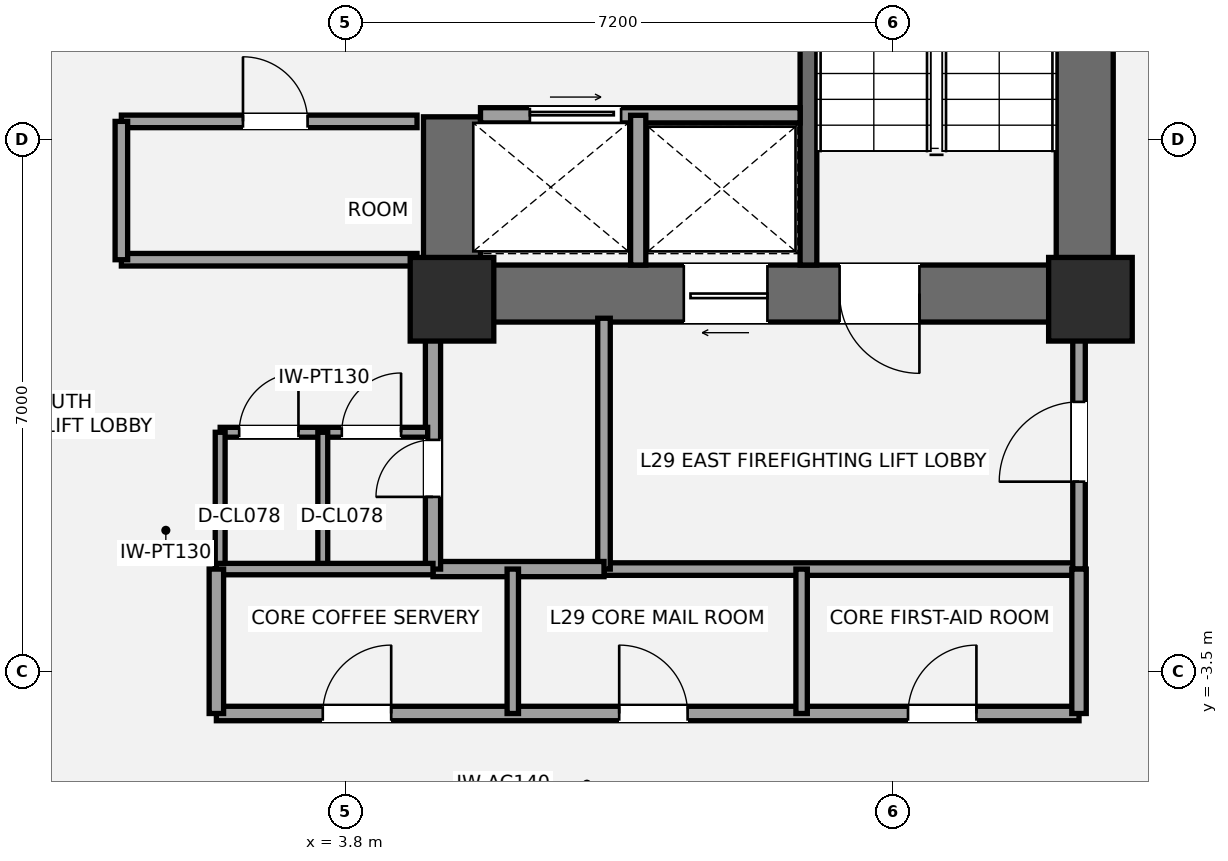
"""IFC4 building model, lengths in metres.
Left out: names, types, materials, properties, quantities, classifications, styles, units other than length and angle.
Written with IfcOpenShell. Run it as: python <this file> out.ifc"""

import sys

from ifc_helpers import new_model, si_unit, direction, frame, frame_2d, origin, origin_2d, place, context, subcontext, project, spatial, rectangle, extrude, element, fill, save


model = new_model("IFC4")
c1 = context("Model", 3, precision=1e-05, world=origin(), true_north=direction((0.0, 1.0)))
c2 = subcontext(c1, "Body", "Model", "MODEL_VIEW")
j1 = project(units=[si_unit("LENGTHUNIT", "METRE"), si_unit("PLANEANGLEUNIT", "RADIAN")], contexts=[c1])
p1 = place(None, origin())
s1 = spatial("IfcSite", under=j1, at=p1, CompositionType="ELEMENT")
p2 = place(p1, origin())
s2 = spatial("IfcBuilding", under=s1, at=p2, CompositionType="ELEMENT")
p3 = place(p2, frame((0.0, 0.0, 110.6)))
s3 = spatial("IfcBuildingStorey", under=s2, at=p3, CompositionType="ELEMENT", Elevation=110.6)
p4 = place(p3, frame((13.525, 1.1, 0.0), z_axis=(0.0, 0.0, 1.0), x_axis=(0.0, 1.0, 0.0)))
e1 = element("IfcWall", 1, at=p4, inside=s3, PredefinedType="SHEAR", context=c2, shape_type="SweptSolid", body=[
    extrude(rectangle(XDim=8.65, YDim=0.75, at=frame_2d((4.325, 0.0))), origin(), (0.0, 0.0, 1.0), 3.5),
])
p5 = place(p3, frame((13.9, 1.475, 0.0), z_axis=(0.0, 0.0, 1.0), x_axis=(-1.0, 0.0, 0.0)))
e2 = element("IfcWall", 2, at=p5, inside=s3, PredefinedType="SHEAR", context=c2, shape_type="SweptSolid", body=[
    extrude(rectangle(XDim=9.075, YDim=0.75, at=frame_2d((4.538, 0.0))), origin(), (0.0, 0.0, 1.0), 3.5),
])
p6 = place(p5, frame((2.55, 0.0, 0.0)))
e3 = element("IfcOpeningElement", 3, at=p6, cuts=e2, PredefinedType="OPENING", context=c2, shape_type="SweptSolid", body=[
    extrude(rectangle(XDim=1.05, YDim=2.15, at=frame_2d((0.525, 1.075))), frame((0.0, 0.385, 0.0), z_axis=(0.0, -1.0, 0.0), x_axis=(1.0, 0.0, 0.0)), (0.0, 0.0, 1.0), 0.77),
])
p7 = place(p5, frame((4.55, 0.0, 0.0)))
e4 = element("IfcOpeningElement", 4, at=p7, cuts=e2, PredefinedType="OPENING", context=c2, shape_type="SweptSolid", body=[
    extrude(rectangle(XDim=1.1, YDim=2.2, at=frame_2d((0.55, 1.1))), frame((0.0, 0.385, 0.0), z_axis=(0.0, -1.0, 0.0), x_axis=(1.0, 0.0, 0.0)), (0.0, 0.0, 1.0), 0.77),
])
p8 = place(p3, frame((5.2, 1.1, 0.0), z_axis=(0.0, 0.0, 1.0), x_axis=(0.0, 1.0, 0.0)))
e5 = element("IfcWall", 5, at=p8, inside=s3, PredefinedType="SHEAR", context=c2, shape_type="SweptSolid", body=[
    extrude(rectangle(XDim=2.7, YDim=0.75, at=frame_2d((1.35, 0.0))), origin(), (0.0, 0.0, 1.0), 3.5),
])
p9 = place(p3, frame((9.89, 1.85, 0.0), z_axis=(0.0, 0.0, 1.0), x_axis=(0.0, 1.0, 0.0)))
e6 = element("IfcWall", 6, at=p9, inside=s3, PredefinedType="SHEAR", context=c2, shape_type="SweptSolid", body=[
    extrude(rectangle(XDim=7.15, YDim=0.22, at=frame_2d((3.575, 0.0))), origin(), (0.0, 0.0, 1.0), 3.5),
])
for number, where, z_axis, x_axis in (
    (7, (5.2, 1.4, 0.0), (0.0, 0.0, 1.0), (1.0, 0.0, 0.0)),
    (8, (13.6, 1.4, 0.0), (0.0, 0.0, 1.0), (1.0, 0.0, 0.0)),
):
    element("IfcColumn", number, at=place(p3, frame(where, z_axis=z_axis, x_axis=x_axis)), inside=s3, PredefinedType="COLUMN", context=c2, shape_type="SweptSolid", body=[
        extrude(rectangle(XDim=1.1, YDim=1.1, at=origin_2d()), origin(), (0.0, 0.0, 1.0), 3.5),
    ])
p10 = place(p3, frame((7.2, -2.15, 0.0), z_axis=(0.0, 0.0, 1.0), x_axis=(1.0, 0.0, 0.0)))
e9 = element("IfcWall", 9, at=p10, inside=s3, PredefinedType="PARTITIONING", context=c2, shape_type="SweptSolid", body=[
    extrude(rectangle(XDim=6.25, YDim=0.165, at=frame_2d((3.125, 0.0))), origin(), (0.0, 0.0, 1.0), 3.31),
])
p11 = place(p3, frame((7.2, -2.15, 0.0), z_axis=(0.0, 0.0, 1.0), x_axis=(0.0, 1.0, 0.0)))
e10 = element("IfcWall", 10, at=p11, inside=s3, PredefinedType="PARTITIONING", context=c2, shape_type="SweptSolid", body=[
    extrude(rectangle(XDim=3.3, YDim=0.165, at=frame_2d((1.65, 0.0))), origin(), (0.0, 0.0, 1.0), 3.31),
])
p12 = place(p3, frame((13.45, -2.15, 0.0), z_axis=(0.0, 0.0, 1.0), x_axis=(0.0, 1.0, 0.0)))
e11 = element("IfcWall", 11, at=p12, inside=s3, PredefinedType="PARTITIONING", context=c2, shape_type="SweptSolid", body=[
    extrude(rectangle(XDim=3.3, YDim=0.165, at=frame_2d((1.65, 0.0))), origin(), (0.0, 0.0, 1.0), 2.763),
])
p13 = place(p12, frame((1.15, 0.0, 0.0)))
e12 = element("IfcOpeningElement", 12, at=p13, cuts=e11, PredefinedType="OPENING", context=c2, shape_type="SweptSolid", body=[
    extrude(rectangle(XDim=1.05, YDim=2.15, at=frame_2d((0.525, 1.075))), frame((0.0, 0.093, 0.0), z_axis=(0.0, -1.0, 0.0), x_axis=(1.0, 0.0, 0.0)), (0.0, 0.0, 1.0), 0.185),
])
p14 = place(p3, frame((4.95, -2.15, 0.0), z_axis=(0.0, 0.0, 1.0), x_axis=(1.0, 0.0, 0.0)))
e13 = element("IfcWall", 13, at=p14, inside=s3, PredefinedType="SOLIDWALL", context=c2, shape_type="SweptSolid", body=[
    extrude(rectangle(XDim=2.25, YDim=0.2, at=frame_2d((1.125, 0.0))), origin(), (0.0, 0.0, 1.0), 3.31),
])
p15 = place(p3, frame((4.95, -2.15, 0.0), z_axis=(0.0, 0.0, 1.0), x_axis=(0.0, 1.0, 0.0)))
e14 = element("IfcWall", 14, at=p15, inside=s3, PredefinedType="SOLIDWALL", context=c2, shape_type="SweptSolid", body=[
    extrude(rectangle(XDim=3.3, YDim=0.2, at=frame_2d((1.65, 0.0))), origin(), (0.0, 0.0, 1.0), 3.31),
])
p16 = place(p15, frame((0.95, 0.0, 0.0)))
e15 = element("IfcOpeningElement", 15, at=p16, cuts=e14, PredefinedType="OPENING", context=c2, shape_type="SweptSolid", body=[
    extrude(rectangle(XDim=0.75, YDim=2.1, at=frame_2d((0.375, 1.05))), frame((0.0, 0.11, 0.0), z_axis=(0.0, -1.0, 0.0), x_axis=(1.0, 0.0, 0.0)), (0.0, 0.0, 1.0), 0.22),
])
p17 = place(p3, frame((2.15, -0.35, 0.0), z_axis=(0.0, 0.0, 1.0), x_axis=(1.0, 0.0, 0.0)))
e16 = element("IfcWall", 16, at=p17, inside=s3, PredefinedType="PARTITIONING", context=c2, shape_type="SweptSolid", body=[
    extrude(rectangle(XDim=2.73, YDim=0.13, at=frame_2d((1.365, 0.0))), origin(), (0.0, 0.0, 1.0), 3.31),
])
p18 = place(p17, frame((0.25, 0.0, 0.0)))
e17 = element("IfcOpeningElement", 17, at=p18, cuts=e16, PredefinedType="OPENING", context=c2, shape_type="SweptSolid", body=[
    extrude(rectangle(XDim=0.78, YDim=2.1, at=frame_2d((0.39, 1.05))), frame((0.0, 0.075, 0.0), z_axis=(0.0, -1.0, 0.0), x_axis=(1.0, 0.0, 0.0)), (0.0, 0.0, 1.0), 0.15),
])
p19 = place(p17, frame((1.6, 0.0, 0.0)))
e18 = element("IfcOpeningElement", 18, at=p19, cuts=e16, PredefinedType="OPENING", context=c2, shape_type="SweptSolid", body=[
    extrude(rectangle(XDim=0.78, YDim=2.1, at=frame_2d((0.39, 1.05))), frame((0.0, 0.075, 0.0), z_axis=(0.0, -1.0, 0.0), x_axis=(1.0, 0.0, 0.0)), (0.0, 0.0, 1.0), 0.15),
])
for number, where, z_axis, x_axis in (
    (19, (2.15, -2.15, 0.0), (0.0, 0.0, 1.0), (0.0, 1.0, 0.0)),
    (20, (3.5, -2.15, 0.0), (0.0, 0.0, 1.0), (0.0, 1.0, 0.0)),
):
    element("IfcWall", number, at=place(p3, frame(where, z_axis=z_axis, x_axis=x_axis)), inside=s3, PredefinedType="PARTITIONING", context=c2, shape_type="SweptSolid", body=[
        extrude(rectangle(XDim=1.8, YDim=0.13, at=frame_2d((0.9, 0.0))), origin(), (0.0, 0.0, 1.0), 3.31),
    ])
p20 = place(p3, frame((5.575, 3.82, 0.0), z_axis=(0.0, 0.0, 1.0), x_axis=(1.0, 0.0, 0.0)))
e21 = element("IfcWall", 21, at=p20, inside=s3, PredefinedType="SOLIDWALL", context=c2, shape_type="SweptSolid", body=[
    extrude(rectangle(XDim=4.205, YDim=0.2, at=frame_2d((2.103, 0.0))), origin(), (0.0, 0.0, 1.0), 3.31),
])
p21 = place(p20, frame((0.65, 0.0, 0.0)))
e22 = element("IfcOpeningElement", 22, at=p21, cuts=e21, PredefinedType="OPENING", context=c2, shape_type="SweptSolid", body=[
    extrude(rectangle(XDim=1.2, YDim=2.2, at=frame_2d((0.6, 1.1))), frame((0.0, 0.11, 0.0), z_axis=(0.0, -1.0, 0.0), x_axis=(1.0, 0.0, 0.0)), (0.0, 0.0, 1.0), 0.22),
])
p22 = place(p3, frame((7.65, 1.85, 0.0), z_axis=(0.0, 0.0, 1.0), x_axis=(0.0, 1.0, 0.0)))
e23 = element("IfcWall", 23, at=p22, inside=s3, PredefinedType="SOLIDWALL", context=c2, shape_type="SweptSolid", body=[
    extrude(rectangle(XDim=1.97, YDim=0.2, at=frame_2d((0.985, 0.0))), origin(), (0.0, 0.0, 1.0), 3.31),
])
p23 = place(p3, frame((0.85, 1.92, 0.0), z_axis=(0.0, 0.0, 1.0), x_axis=(1.0, 0.0, 0.0)))
e24 = element("IfcWall", 24, at=p23, inside=s3, PredefinedType="PARTITIONING", context=c2, shape_type="SweptSolid", body=[
    extrude(rectangle(XDim=3.89, YDim=0.165, at=frame_2d((1.945, 0.0))), origin(), (0.0, 0.0, 1.0), 2.3),
])
p24 = place(p3, frame((0.85, 3.74, 0.0), z_axis=(0.0, 0.0, 1.0), x_axis=(1.0, 0.0, 0.0)))
e25 = element("IfcWall", 25, at=p24, inside=s3, PredefinedType="PARTITIONING", context=c2, shape_type="SweptSolid", body=[
    extrude(rectangle(XDim=3.89, YDim=0.165, at=frame_2d((1.945, 0.0))), origin(), (0.0, 0.0, 1.0), 3.31),
])
p25 = place(p24, frame((1.6, 0.0, 0.0)))
e26 = element("IfcOpeningElement", 26, at=p25, cuts=e25, PredefinedType="OPENING", context=c2, shape_type="SweptSolid", body=[
    extrude(rectangle(XDim=0.85, YDim=2.1, at=frame_2d((0.425, 1.05))), frame((0.0, 0.093, 0.0), z_axis=(0.0, -1.0, 0.0), x_axis=(1.0, 0.0, 0.0)), (0.0, 0.0, 1.0), 0.185),
])
p26 = place(p3, frame((0.85, 1.92, 0.0), z_axis=(0.0, 0.0, 1.0), x_axis=(0.0, 1.0, 0.0)))
e27 = element("IfcWall", 27, at=p26, inside=s3, PredefinedType="PARTITIONING", context=c2, shape_type="SweptSolid", body=[
    extrude(rectangle(XDim=1.82, YDim=0.165, at=frame_2d((0.91, 0.0))), origin(), (0.0, 0.0, 1.0), 3.31),
])
p27 = place(p3, frame((2.1, -4.05, 0.0), z_axis=(0.0, 0.0, 1.0), x_axis=(1.0, 0.0, 0.0)))
e28 = element("IfcWall", 28, at=p27, inside=s3, PredefinedType="PLUMBINGWALL", context=c2, shape_type="SweptSolid", body=[
    extrude(rectangle(XDim=11.35, YDim=0.19, at=frame_2d((5.675, 0.0))), origin(), (0.0, 0.0, 1.0), 2.763),
])
p28 = place(p27, frame((1.4, 0.0, 0.0)))
e29 = element("IfcOpeningElement", 29, at=p28, cuts=e28, PredefinedType="OPENING", context=c2, shape_type="SweptSolid", body=[
    extrude(rectangle(XDim=0.9, YDim=2.1, at=frame_2d((0.45, 1.05))), frame((0.0, 0.105, 0.0), z_axis=(0.0, -1.0, 0.0), x_axis=(1.0, 0.0, 0.0)), (0.0, 0.0, 1.0), 0.21),
])
p29 = place(p27, frame((5.3, 0.0, 0.0)))
e30 = element("IfcOpeningElement", 30, at=p29, cuts=e28, PredefinedType="OPENING", context=c2, shape_type="SweptSolid", body=[
    extrude(rectangle(XDim=0.9, YDim=2.1, at=frame_2d((0.45, 1.05))), frame((0.0, 0.105, 0.0), z_axis=(0.0, -1.0, 0.0), x_axis=(1.0, 0.0, 0.0)), (0.0, 0.0, 1.0), 0.21),
])
p30 = place(p27, frame((9.1, 0.0, 0.0)))
e31 = element("IfcOpeningElement", 31, at=p30, cuts=e28, PredefinedType="OPENING", context=c2, shape_type="SweptSolid", body=[
    extrude(rectangle(XDim=0.9, YDim=2.1, at=frame_2d((0.45, 1.05))), frame((0.0, 0.105, 0.0), z_axis=(0.0, -1.0, 0.0), x_axis=(1.0, 0.0, 0.0)), (0.0, 0.0, 1.0), 0.21),
])
p31 = place(p3, frame((2.1, -2.15, 0.0), z_axis=(0.0, 0.0, 1.0), x_axis=(1.0, 0.0, 0.0)))
e32 = element("IfcWall", 32, at=p31, inside=s3, PredefinedType="PLUMBINGWALL", context=c2, shape_type="SweptSolid", body=[
    extrude(rectangle(XDim=2.85, YDim=0.15, at=frame_2d((1.425, 0.0))), origin(), (0.0, 0.0, 1.0), 2.763),
])
for number, where, z_axis, x_axis in (
    (33, (2.1, -4.05, 0.0), (0.0, 0.0, 1.0), (0.0, 1.0, 0.0)),
    (34, (13.45, -4.05, 0.0), (0.0, 0.0, 1.0), (0.0, 1.0, 0.0)),
):
    element("IfcWall", number, at=place(p3, frame(where, z_axis=z_axis, x_axis=x_axis)), inside=s3, PredefinedType="PLUMBINGWALL", context=c2, shape_type="SweptSolid", body=[
        extrude(rectangle(XDim=1.9, YDim=0.19, at=frame_2d((0.95, 0.0))), origin(), (0.0, 0.0, 1.0), 3.31),
    ])
p32 = place(p3, frame((6.0, -4.05, 0.0), z_axis=(0.0, 0.0, 1.0), x_axis=(0.0, 1.0, 0.0)))
e35 = element("IfcWall", 35, at=p32, inside=s3, PredefinedType="PLUMBINGWALL", context=c2, shape_type="SweptSolid", body=[
    extrude(rectangle(XDim=1.9, YDim=0.15, at=frame_2d((0.95, 0.0))), origin(), (0.0, 0.0, 1.0), 2.763),
])
p33 = place(p3, frame((9.8, -4.05, 0.0), z_axis=(0.0, 0.0, 1.0), x_axis=(0.0, 1.0, 0.0)))
e36 = element("IfcWall", 36, at=p33, inside=s3, PredefinedType="PLUMBINGWALL", context=c2, shape_type="SweptSolid", body=[
    extrude(rectangle(XDim=1.9, YDim=0.15, at=frame_2d((0.95, 0.0))), origin(), (0.0, 0.0, 1.0), 3.31),
])
p34 = place(p6, origin())
e37 = element("IfcDoor", 37, at=p34, inside=s3, OperationType="SINGLE_SWING_LEFT", PredefinedType="DOOR", context=c2, shape_type="SweptSolid", body=[
    extrude(rectangle(XDim=1.05, YDim=2.15, at=frame_2d((0.525, 1.075))), frame((0.0, 0.025, 0.0), z_axis=(0.0, -1.0, 0.0), x_axis=(1.0, 0.0, 0.0)), (0.0, 0.0, 1.0), 0.05),
])
fill(e3, e37)
p35 = place(p13, origin())
e38 = element("IfcDoor", 38, at=p35, inside=s3, OperationType="SINGLE_SWING_LEFT", PredefinedType="DOOR", context=c2, shape_type="SweptSolid", body=[
    extrude(rectangle(XDim=1.05, YDim=2.15, at=frame_2d((0.525, 1.075))), frame((0.0, 0.025, 0.0), z_axis=(0.0, -1.0, 0.0), x_axis=(1.0, 0.0, 0.0)), (0.0, 0.0, 1.0), 0.05),
])
fill(e12, e38)
p36 = place(p16, origin())
e39 = element("IfcDoor", 39, at=p36, inside=s3, OperationType="SINGLE_SWING_LEFT", PredefinedType="DOOR", context=c2, shape_type="SweptSolid", body=[
    extrude(rectangle(XDim=0.75, YDim=2.1, at=frame_2d((0.375, 1.05))), frame((0.0, 0.025, 0.0), z_axis=(0.0, -1.0, 0.0), x_axis=(1.0, 0.0, 0.0)), (0.0, 0.0, 1.0), 0.05),
])
fill(e15, e39)
p37 = place(p18, origin())
e40 = element("IfcDoor", 40, at=p37, inside=s3, OperationType="SINGLE_SWING_RIGHT", PredefinedType="DOOR", context=c2, shape_type="SweptSolid", body=[
    extrude(rectangle(XDim=0.78, YDim=2.1, at=frame_2d((0.39, 1.05))), frame((0.0, 0.025, 0.0), z_axis=(0.0, -1.0, 0.0), x_axis=(1.0, 0.0, 0.0)), (0.0, 0.0, 1.0), 0.05),
])
fill(e17, e40)
p38 = place(p19, origin())
e41 = element("IfcDoor", 41, at=p38, inside=s3, OperationType="SINGLE_SWING_RIGHT", PredefinedType="DOOR", context=c2, shape_type="SweptSolid", body=[
    extrude(rectangle(XDim=0.78, YDim=2.1, at=frame_2d((0.39, 1.05))), frame((0.0, 0.025, 0.0), z_axis=(0.0, -1.0, 0.0), x_axis=(1.0, 0.0, 0.0)), (0.0, 0.0, 1.0), 0.05),
])
fill(e18, e41)
p39 = place(p7, origin())
e42 = element("IfcDoor", 42, at=p39, inside=s3, OperationType="SLIDING_TO_LEFT", PredefinedType="DOOR", context=c2, shape_type="SweptSolid", body=[
    extrude(rectangle(XDim=1.1, YDim=2.2, at=frame_2d((0.55, 1.1))), frame((0.0, 0.025, 0.0), z_axis=(0.0, -1.0, 0.0), x_axis=(1.0, 0.0, 0.0)), (0.0, 0.0, 1.0), 0.05),
])
fill(e4, e42)
p40 = place(p21, origin())
e43 = element("IfcDoor", 43, at=p40, inside=s3, OperationType="SLIDING_TO_RIGHT", PredefinedType="DOOR", context=c2, shape_type="SweptSolid", body=[
    extrude(rectangle(XDim=1.2, YDim=2.2, at=frame_2d((0.6, 1.1))), frame((0.0, 0.025, 0.0), z_axis=(0.0, -1.0, 0.0), x_axis=(1.0, 0.0, 0.0)), (0.0, 0.0, 1.0), 0.05),
])
fill(e22, e43)
p41 = place(p25, origin())
e44 = element("IfcDoor", 44, at=p41, inside=s3, OperationType="SINGLE_SWING_LEFT", PredefinedType="DOOR", context=c2, shape_type="SweptSolid", body=[
    extrude(rectangle(XDim=0.85, YDim=2.1, at=frame_2d((0.425, 1.05))), frame((0.0, 0.025, 0.0), z_axis=(0.0, -1.0, 0.0), x_axis=(1.0, 0.0, 0.0)), (0.0, 0.0, 1.0), 0.05),
])
fill(e26, e44)
p42 = place(p28, origin())
e45 = element("IfcDoor", 45, at=p42, inside=s3, OperationType="SINGLE_SWING_RIGHT", PredefinedType="DOOR", context=c2, shape_type="SweptSolid", body=[
    extrude(rectangle(XDim=0.9, YDim=2.1, at=frame_2d((0.45, 1.05))), frame((0.0, 0.025, 0.0), z_axis=(0.0, -1.0, 0.0), x_axis=(1.0, 0.0, 0.0)), (0.0, 0.0, 1.0), 0.05),
])
fill(e29, e45)
p43 = place(p29, origin())
e46 = element("IfcDoor", 46, at=p43, inside=s3, OperationType="SINGLE_SWING_LEFT", PredefinedType="DOOR", context=c2, shape_type="SweptSolid", body=[
    extrude(rectangle(XDim=0.9, YDim=2.1, at=frame_2d((0.45, 1.05))), frame((0.0, 0.025, 0.0), z_axis=(0.0, -1.0, 0.0), x_axis=(1.0, 0.0, 0.0)), (0.0, 0.0, 1.0), 0.05),
])
fill(e30, e46)
p44 = place(p30, origin())
e47 = element("IfcDoor", 47, at=p44, inside=s3, OperationType="SINGLE_SWING_RIGHT", PredefinedType="DOOR", context=c2, shape_type="SweptSolid", body=[
    extrude(rectangle(XDim=0.9, YDim=2.1, at=frame_2d((0.45, 1.05))), frame((0.0, 0.025, 0.0), z_axis=(0.0, -1.0, 0.0), x_axis=(1.0, 0.0, 0.0)), (0.0, 0.0, 1.0), 0.05),
])
fill(e31, e47)
save(model, sys.argv[1])
